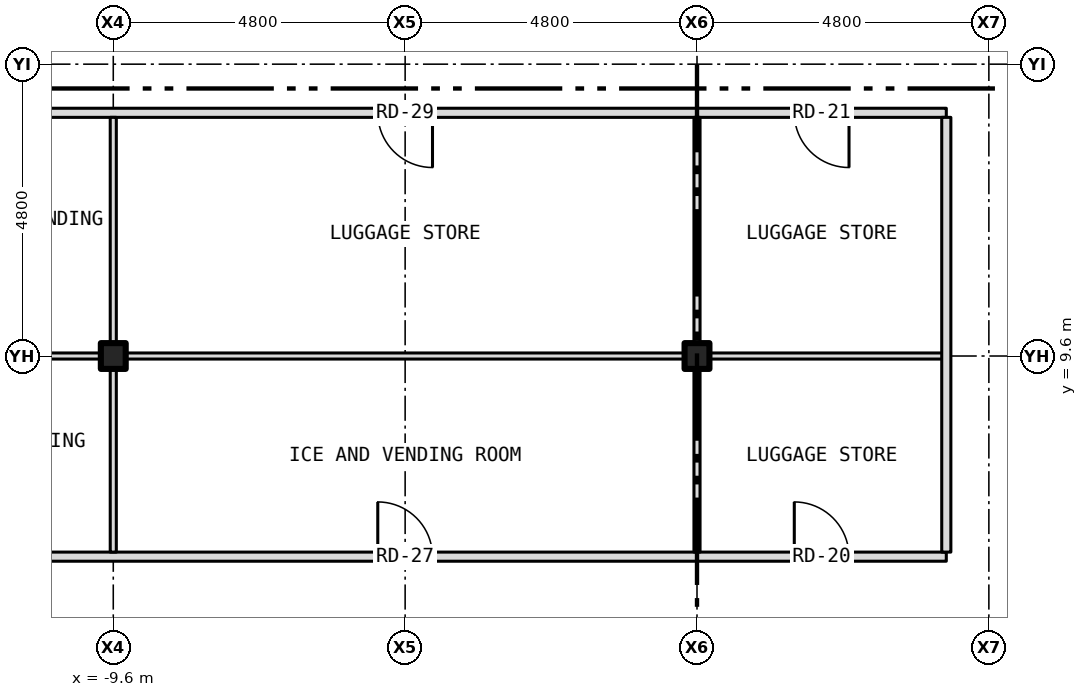
"""IFC4 building model, lengths in metres.
Left out: names, types, materials, properties, quantities, classifications, styles, units other than length and angle.
Written with IfcOpenShell. Run it as: python <this file> out.ifc"""

import sys

from ifc_helpers import new_model, si_unit, direction, frame, frame_2d, origin, origin_2d, place, context, subcontext, project, spatial, rectangle, i_section, extrude, element, fill, save


model = new_model("IFC4")
c1 = context("Model", 3, precision=1e-05, world=origin(), true_north=direction((0.0, 1.0)))
c2 = subcontext(c1, "Body", "Model", "MODEL_VIEW")
j1 = project(units=[si_unit("LENGTHUNIT", "METRE"), si_unit("PLANEANGLEUNIT", "RADIAN")], contexts=[c1])
p1 = place(None, origin())
s1 = spatial("IfcSite", under=j1, at=p1, CompositionType="ELEMENT")
p2 = place(p1, origin())
s2 = spatial("IfcBuilding", under=s1, at=p2, CompositionType="ELEMENT")
p3 = place(p2, frame((0.0, 0.0, 56.5)))
s3 = spatial("IfcBuildingStorey", under=s2, at=p3, CompositionType="ELEMENT", Elevation=56.5)
for number, where, z_axis, x_axis in (
    (1, (-9.6, 9.6, -0.15), (0.0, 0.0, 1.0), (1.0, 0.0, 0.0)),
    (2, (0.0, 9.6, -0.15), (0.0, 0.0, 1.0), (1.0, 0.0, 0.0)),
):
    element("IfcColumn", number, at=place(p3, frame(where, z_axis=z_axis, x_axis=x_axis)), inside=s3, PredefinedType="COLUMN", context=c2, shape_type="SweptSolid", body=[
        extrude(i_section(OverallWidth=0.409, OverallDepth=0.424, WebThickness=0.033, FlangeThickness=0.052, at=origin_2d()), origin(), (0.0, 0.0, 1.0), 3.5),
    ])
p4 = place(p3, frame((-12.8, 6.3, 0.0), z_axis=(0.0, 0.0, 1.0), x_axis=(1.0, 0.0, 0.0)))
e3 = element("IfcWall", 3, at=p4, inside=s3, PredefinedType="PARTITIONING", context=c2, shape_type="SweptSolid", body=[
    extrude(rectangle(XDim=16.9, YDim=0.15, at=frame_2d((8.45, 0.0))), origin(), (0.0, 0.0, 1.0), 3.35),
])
p5 = place(p4, frame((14.4, 0.0, 0.0)))
e4 = element("IfcOpeningElement", 4, at=p5, cuts=e3, PredefinedType="OPENING", context=c2, shape_type="SweptSolid", body=[
    extrude(rectangle(XDim=0.9, YDim=2.1, at=frame_2d((0.45, 1.05))), frame((0.0, 0.087, 0.0), z_axis=(0.0, -1.0, 0.0), x_axis=(1.0, 0.0, 0.0)), (0.0, 0.0, 1.0), 0.174),
])
p6 = place(p4, frame((7.55, 0.0, 0.0)))
e5 = element("IfcOpeningElement", 5, at=p6, cuts=e3, PredefinedType="OPENING", context=c2, shape_type="SweptSolid", body=[
    extrude(rectangle(XDim=0.9, YDim=2.1, at=frame_2d((0.45, 1.05))), frame((0.0, 0.087, 0.0), z_axis=(0.0, -1.0, 0.0), x_axis=(1.0, 0.0, 0.0)), (0.0, 0.0, 1.0), 0.174),
])
p7 = place(p3, frame((-12.8, 9.6, 0.0), z_axis=(0.0, 0.0, 1.0), x_axis=(1.0, 0.0, 0.0)))
e6 = element("IfcWall", 6, at=p7, inside=s3, PredefinedType="PARTITIONING", context=c2, shape_type="SweptSolid", body=[
    extrude(rectangle(XDim=2.996, YDim=0.1, at=frame_2d((1.498, 0.0))), origin(), (0.0, 0.0, 1.0), 2.728),
])
p8 = place(p3, frame((-9.804, 9.6, 0.0), z_axis=(0.0, 0.0, 1.0), x_axis=(1.0, 0.0, 0.0)))
e7 = element("IfcWall", 7, at=p8, inside=s3, PredefinedType="PARTITIONING", context=c2, shape_type="SweptSolid", body=[
    extrude(rectangle(XDim=0.408, YDim=0.1, at=frame_2d((0.204, 0.0))), origin(), (0.0, 0.0, 1.0), 3.35),
])
p9 = place(p3, frame((-9.396, 9.6, 0.0), z_axis=(0.0, 0.0, 1.0), x_axis=(1.0, 0.0, 0.0)))
e8 = element("IfcWall", 8, at=p9, inside=s3, PredefinedType="PARTITIONING", context=c2, shape_type="SweptSolid", body=[
    extrude(rectangle(XDim=9.192, YDim=0.1, at=frame_2d((4.596, 0.0))), origin(), (0.0, 0.0, 1.0), 2.728),
])
p10 = place(p3, frame((-0.204, 9.6, 0.0), z_axis=(0.0, 0.0, 1.0), x_axis=(1.0, 0.0, 0.0)))
e9 = element("IfcWall", 9, at=p10, inside=s3, PredefinedType="PARTITIONING", context=c2, shape_type="SweptSolid", body=[
    extrude(rectangle(XDim=0.408, YDim=0.1, at=frame_2d((0.204, 0.0))), origin(), (0.0, 0.0, 1.0), 3.35),
])
p11 = place(p3, frame((0.204, 9.6, 0.0), z_axis=(0.0, 0.0, 1.0), x_axis=(1.0, 0.0, 0.0)))
e10 = element("IfcWall", 10, at=p11, inside=s3, PredefinedType="PARTITIONING", context=c2, shape_type="SweptSolid", body=[
    extrude(rectangle(XDim=3.896, YDim=0.1, at=frame_2d((1.948, 0.0))), origin(), (0.0, 0.0, 1.0), 2.728),
])
p12 = place(p3, frame((-12.8, 13.6, 0.0), z_axis=(0.0, 0.0, 1.0), x_axis=(1.0, 0.0, 0.0)))
e11 = element("IfcWall", 11, at=p12, inside=s3, PredefinedType="PARTITIONING", context=c2, shape_type="SweptSolid", body=[
    extrude(rectangle(XDim=16.9, YDim=0.15, at=frame_2d((8.45, 0.0))), origin(), (0.0, 0.0, 1.0), 3.35),
])
p13 = place(p12, frame((1.15, 0.0, 0.0)))
e12 = element("IfcOpeningElement", 12, at=p13, cuts=e11, PredefinedType="OPENING", context=c2, shape_type="SweptSolid", body=[
    extrude(rectangle(XDim=0.9, YDim=2.1, at=frame_2d((0.45, 1.05))), frame((0.0, 0.087, 0.0), z_axis=(0.0, -1.0, 0.0), x_axis=(1.0, 0.0, 0.0)), (0.0, 0.0, 1.0), 0.174),
])
p14 = place(p12, frame((14.4, 0.0, 0.0)))
e13 = element("IfcOpeningElement", 13, at=p14, cuts=e11, PredefinedType="OPENING", context=c2, shape_type="SweptSolid", body=[
    extrude(rectangle(XDim=0.9, YDim=2.1, at=frame_2d((0.45, 1.05))), frame((0.0, 0.087, 0.0), z_axis=(0.0, -1.0, 0.0), x_axis=(1.0, 0.0, 0.0)), (0.0, 0.0, 1.0), 0.174),
])
p15 = place(p12, frame((7.55, 0.0, 0.0)))
e14 = element("IfcOpeningElement", 14, at=p15, cuts=e11, PredefinedType="OPENING", context=c2, shape_type="SweptSolid", body=[
    extrude(rectangle(XDim=0.9, YDim=2.1, at=frame_2d((0.45, 1.05))), frame((0.0, 0.087, 0.0), z_axis=(0.0, -1.0, 0.0), x_axis=(1.0, 0.0, 0.0)), (0.0, 0.0, 1.0), 0.174),
])
p16 = place(p3, frame((-9.6, 6.375, 0.0), z_axis=(0.0, 0.0, 1.0), x_axis=(0.0, 1.0, 0.0)))
e15 = element("IfcWall", 15, at=p16, inside=s3, PredefinedType="PARTITIONING", context=c2, shape_type="SweptSolid", body=[
    extrude(rectangle(XDim=3.175, YDim=0.1, at=frame_2d((1.587, 0.0))), origin(), (0.0, 0.0, 1.0), 2.728),
])
p17 = place(p3, frame((-9.6, 9.65, 0.0), z_axis=(0.0, 0.0, 1.0), x_axis=(0.0, 1.0, 0.0)))
e16 = element("IfcWall", 16, at=p17, inside=s3, PredefinedType="PARTITIONING", context=c2, shape_type="SweptSolid", body=[
    extrude(rectangle(XDim=3.875, YDim=0.1, at=frame_2d((1.938, 0.0))), origin(), (0.0, 0.0, 1.0), 2.728),
])
p18 = place(p3, frame((0.0, 6.375, 0.0), z_axis=(0.0, 0.0, 1.0), x_axis=(0.0, 1.0, 0.0)))
e17 = element("IfcWall", 17, at=p18, inside=s3, PredefinedType="PARTITIONING", context=c2, shape_type="SweptSolid", body=[
    extrude(rectangle(XDim=3.175, YDim=0.1, at=frame_2d((1.587, 0.0))), origin(), (0.0, 0.0, 1.0), 2.728),
])
p19 = place(p3, frame((0.0, 9.65, 0.0), z_axis=(0.0, 0.0, 1.0), x_axis=(0.0, 1.0, 0.0)))
e18 = element("IfcWall", 18, at=p19, inside=s3, PredefinedType="PARTITIONING", context=c2, shape_type="SweptSolid", body=[
    extrude(rectangle(XDim=3.875, YDim=0.1, at=frame_2d((1.938, 0.0))), origin(), (0.0, 0.0, 1.0), 2.728),
])
p20 = place(p3, frame((4.1, 6.375, 0.0), z_axis=(0.0, 0.0, 1.0), x_axis=(0.0, 1.0, 0.0)))
e19 = element("IfcWall", 19, at=p20, inside=s3, PredefinedType="PARTITIONING", context=c2, shape_type="SweptSolid", body=[
    extrude(rectangle(XDim=7.15, YDim=0.15, at=frame_2d((3.575, 0.0))), origin(), (0.0, 0.0, 1.0), 3.35),
])
p21 = place(p5, origin())
e20 = element("IfcDoor", 20, at=p21, inside=s3, OperationType="SINGLE_SWING_LEFT", PredefinedType="DOOR", context=c2, shape_type="SweptSolid", body=[
    extrude(rectangle(XDim=0.9, YDim=2.1, at=frame_2d((0.45, 1.05))), frame((0.0, 0.025, 0.0), z_axis=(0.0, -1.0, 0.0), x_axis=(1.0, 0.0, 0.0)), (0.0, 0.0, 1.0), 0.05),
])
fill(e4, e20)
p22 = place(p14, origin())
e21 = element("IfcDoor", 21, at=p22, inside=s3, OperationType="SINGLE_SWING_RIGHT", PredefinedType="DOOR", context=c2, shape_type="SweptSolid", body=[
    extrude(rectangle(XDim=0.9, YDim=2.1, at=frame_2d((0.45, 1.05))), frame((0.0, 0.025, 0.0), z_axis=(0.0, -1.0, 0.0), x_axis=(1.0, 0.0, 0.0)), (0.0, 0.0, 1.0), 0.05),
])
fill(e13, e21)
p23 = place(p6, origin())
e22 = element("IfcDoor", 22, at=p23, inside=s3, OperationType="SINGLE_SWING_LEFT", PredefinedType="DOOR", context=c2, shape_type="SweptSolid", body=[
    extrude(rectangle(XDim=0.9, YDim=2.1, at=frame_2d((0.45, 1.05))), frame((0.0, 0.025, 0.0), z_axis=(0.0, -1.0, 0.0), x_axis=(1.0, 0.0, 0.0)), (0.0, 0.0, 1.0), 0.05),
])
fill(e5, e22)
p24 = place(p15, origin())
e23 = element("IfcDoor", 23, at=p24, inside=s3, OperationType="SINGLE_SWING_RIGHT", PredefinedType="DOOR", context=c2, shape_type="SweptSolid", body=[
    extrude(rectangle(XDim=0.9, YDim=2.1, at=frame_2d((0.45, 1.05))), frame((0.0, 0.025, 0.0), z_axis=(0.0, -1.0, 0.0), x_axis=(1.0, 0.0, 0.0)), (0.0, 0.0, 1.0), 0.05),
])
fill(e14, e23)
save(model, sys.argv[1])
